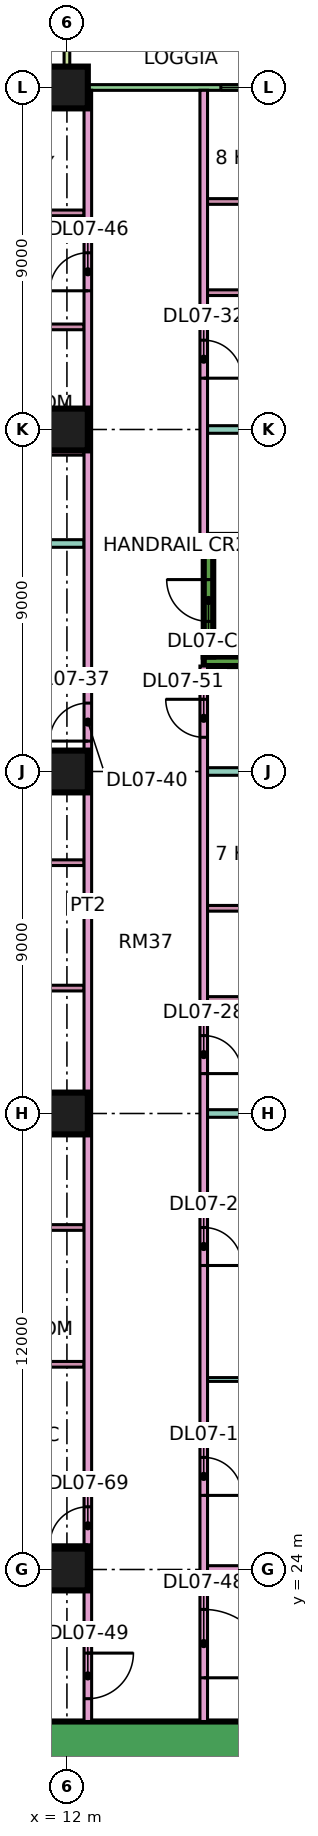
"""IFC4 building model, lengths in metres.
Left out: names, types, materials, properties, quantities, classifications, styles, units other than length and angle.
Written with IfcOpenShell. Run it as: python <this file> out.ifc"""

import sys

from ifc_helpers import new_model, si_unit, direction, frame, frame_2d, origin, origin_2d, place, context, subcontext, project, spatial, rectangle, extrude, element, fill, save


model = new_model("IFC4")
c1 = context("Model", 3, precision=1e-05, world=origin(), true_north=direction((0.0, 1.0)))
c2 = subcontext(c1, "Body", "Model", "MODEL_VIEW")
j1 = project(units=[si_unit("LENGTHUNIT", "METRE"), si_unit("PLANEANGLEUNIT", "RADIAN")], contexts=[c1])
p1 = place(None, origin())
s1 = spatial("IfcSite", under=j1, at=p1, CompositionType="ELEMENT")
p2 = place(p1, origin())
s2 = spatial("IfcBuilding", under=s1, at=p2, CompositionType="ELEMENT")
p3 = place(p2, frame((0.0, 0.0, 41.4)))
s3 = spatial("IfcBuildingStorey", under=s2, at=p3, CompositionType="ELEMENT", Elevation=41.4)
for number, where, z_axis, x_axis in (
    (1, (12.0, 24.0, 0.0), (0.0, 0.0, 1.0), (1.0, 0.0, 0.0)),
    (2, (12.0, 36.0, 0.0), (0.0, 0.0, 1.0), (1.0, 0.0, 0.0)),
    (3, (12.0, 45.0, 0.0), (0.0, 0.0, 1.0), (1.0, 0.0, 0.0)),
    (4, (12.0, 54.0, 0.0), (0.0, 0.0, 1.0), (1.0, 0.0, 0.0)),
    (5, (12.0, 63.0, 0.0), (0.0, 0.0, 1.0), (1.0, 0.0, 0.0)),
):
    element("IfcColumn", number, at=place(p3, frame(where, z_axis=z_axis, x_axis=x_axis)), inside=s3, PredefinedType="COLUMN", context=c2, shape_type="SweptSolid", body=[
        extrude(rectangle(XDim=1.1, YDim=1.1, at=origin_2d()), origin(), (0.0, 0.0, 1.0), 3.75),
    ])
p4 = place(p3, frame((9.0, 19.45, 0.0), z_axis=(0.0, 0.0, 1.0), x_axis=(1.0, 0.0, 0.0)))
e6 = element("IfcWall", 6, at=p4, inside=s3, PredefinedType="SHEAR", context=c2, shape_type="SweptSolid", body=[
    extrude(rectangle(XDim=25.0, YDim=1.1, at=frame_2d((12.5, 0.0))), origin(), (0.0, 0.0, 1.0), 3.75),
])
p5 = place(p4, frame((19.1, 0.0, 0.0)))
e7 = element("IfcOpeningElement", 7, at=p5, cuts=e6, PredefinedType="OPENING", context=c2, shape_type="SweptSolid", body=[
    extrude(rectangle(XDim=1.8, YDim=2.4, at=frame_2d((0.9, 1.2))), frame((0.0, 0.56, 0.0), z_axis=(0.0, -1.0, 0.0), x_axis=(1.0, 0.0, 0.0)), (0.0, 0.0, 1.0), 1.12),
])
for number, where, z_axis, x_axis in (
    (8, (15.6, 47.9, 0.0), (0.0, 0.0, 1.0), (1.0, 0.0, 0.0)),
    (9, (15.6, 51.1, 0.0), (0.0, 0.0, 1.0), (1.0, 0.0, 0.0)),
):
    element("IfcWall", number, at=place(p3, frame(where, z_axis=z_axis, x_axis=x_axis)), inside=s3, PredefinedType="SHEAR", context=c2, shape_type="SweptSolid", body=[
        extrude(rectangle(XDim=7.0, YDim=0.25, at=frame_2d((3.5, 0.0))), origin(), (0.0, 0.0, 1.0), 3.75),
    ])
p6 = place(p3, frame((15.725, 48.025, 0.0), z_axis=(0.0, 0.0, 1.0), x_axis=(0.0, 1.0, 0.0)))
e10 = element("IfcWall", 10, at=p6, inside=s3, PredefinedType="SHEAR", context=c2, shape_type="SweptSolid", body=[
    extrude(rectangle(XDim=2.95, YDim=0.25, at=frame_2d((1.475, 0.0))), origin(), (0.0, 0.0, 1.0), 3.75),
])
p7 = place(p6, frame((0.925, 0.0, 0.0)))
e11 = element("IfcOpeningElement", 11, at=p7, cuts=e10, PredefinedType="OPENING", context=c2, shape_type="SweptSolid", body=[
    extrude(rectangle(XDim=1.1, YDim=2.2, at=frame_2d((0.55, 1.1))), frame((0.0, 0.135, 0.0), z_axis=(0.0, -1.0, 0.0), x_axis=(1.0, 0.0, 0.0)), (0.0, 0.0, 1.0), 0.27),
])
p8 = place(p3, frame((22.425, 63.0, 0.0), z_axis=(0.0, 0.0, 1.0), x_axis=(-1.0, 0.0, 0.0)))
e12 = element("IfcWall", 12, at=p8, inside=s3, PredefinedType="SOLIDWALL", context=c2, shape_type="SweptSolid", body=[
    extrude(rectangle(XDim=10.35, YDim=0.15, at=frame_2d((5.175, 0.0))), origin(), (0.0, 0.0, 1.0), 3.35),
])
p9 = place(p8, frame((0.562, 0.0, 0.45)))
e13 = element("IfcOpeningElement", 13, at=p9, cuts=e12, PredefinedType="OPENING", context=c2, shape_type="SweptSolid", body=[
    extrude(rectangle(XDim=1.2, YDim=2.4, at=frame_2d((0.6, 1.2))), frame((0.0, 0.085, 0.0), z_axis=(0.0, -1.0, 0.0), x_axis=(1.0, 0.0, 0.0)), (0.0, 0.0, 1.0), 0.17),
])
p10 = place(p8, frame((3.975, 0.0, 0.45)))
e14 = element("IfcOpeningElement", 14, at=p10, cuts=e12, PredefinedType="OPENING", context=c2, shape_type="SweptSolid", body=[
    extrude(rectangle(XDim=2.4, YDim=2.4, at=frame_2d((1.2, 1.2))), frame((0.0, 0.085, 0.0), z_axis=(0.0, -1.0, 0.0), x_axis=(1.0, 0.0, 0.0)), (0.0, 0.0, 1.0), 0.17),
])
p11 = place(p3, frame((12.0, 64.5, 0.0), z_axis=(0.0, 0.0, 1.0), x_axis=(0.0, -1.0, 0.0)))
e15 = element("IfcWall", 15, at=p11, inside=s3, PredefinedType="SOLIDWALL", context=c2, shape_type="SweptSolid", body=[
    extrude(rectangle(XDim=1.5, YDim=0.15, at=frame_2d((0.75, 0.0))), origin(), (0.0, 0.0, 1.0), 3.35),
])
p12 = place(p3, frame((0.0, 36.0, 0.0), z_axis=(0.0, 0.0, 1.0), x_axis=(1.0, 0.0, 0.0)))
e16 = element("IfcWall", 16, at=p12, inside=s3, PredefinedType="PARTITIONING", context=c2, shape_type="SweptSolid", body=[
    extrude(rectangle(XDim=12.45, YDim=0.2, at=frame_2d((6.225, 0.0))), origin(), (0.0, 0.0, 1.0), 3.35),
])
p13 = place(p3, frame((-1.35, 51.0, 0.0), z_axis=(0.0, 0.0, 1.0), x_axis=(1.0, 0.0, 0.0)))
e17 = element("IfcWall", 17, at=p13, inside=s3, PredefinedType="PARTITIONING", context=c2, shape_type="SweptSolid", body=[
    extrude(rectangle(XDim=13.8, YDim=0.2, at=frame_2d((6.9, 0.0))), origin(), (0.0, 0.0, 1.0), 3.35),
])
p14 = place(p3, frame((0.074, 22.4, 0.0), z_axis=(0.0, 0.0, 1.0), x_axis=(1.0, 0.0, 0.0)))
e18 = element("IfcWall", 18, at=p14, inside=s3, PredefinedType="PARTITIONING", context=c2, shape_type="SweptSolid", body=[
    extrude(rectangle(XDim=12.376, YDim=0.2, at=frame_2d((6.188, 0.0))), origin(), (0.0, 0.0, 1.0), 3.35),
])
p15 = place(p3, frame((7.1, 47.4, 0.0), z_axis=(0.0, 0.0, 1.0), x_axis=(1.0, 0.0, 0.0)))
e19 = element("IfcWall", 19, at=p15, inside=s3, PredefinedType="PARTITIONING", context=c2, shape_type="SweptSolid", body=[
    extrude(rectangle(XDim=5.35, YDim=0.1, at=frame_2d((2.675, 0.0))), origin(), (0.0, 0.0, 1.0), 3.35),
])
p16 = place(p15, frame((2.3, 0.0, 0.0)))
e20 = element("IfcOpeningElement", 20, at=p16, cuts=e19, PredefinedType="OPENING", context=c2, shape_type="SweptSolid", body=[
    extrude(rectangle(XDim=0.9, YDim=2.1, at=frame_2d((0.45, 1.05))), frame((0.0, 0.06, 0.0), z_axis=(0.0, -1.0, 0.0), x_axis=(1.0, 0.0, 0.0)), (0.0, 0.0, 1.0), 0.12),
])
for number, where, z_axis, x_axis in (
    (21, (7.225, 39.3, 0.0), (0.0, 0.0, 1.0), (1.0, 0.0, 0.0)),
    (22, (7.225, 42.6, 0.0), (0.0, 0.0, 1.0), (1.0, 0.0, 0.0)),
    (23, (7.225, 45.3, 0.0), (0.0, 0.0, 1.0), (1.0, 0.0, 0.0)),
):
    element("IfcWall", number, at=place(p3, frame(where, z_axis=z_axis, x_axis=x_axis)), inside=s3, PredefinedType="PARTITIONING", context=c2, shape_type="SweptSolid", body=[
        extrude(rectangle(XDim=5.225, YDim=0.15, at=frame_2d((2.612, 0.0))), origin(), (0.0, 0.0, 1.0), 3.35),
    ])
p17 = place(p3, frame((8.275, 59.7, 0.0), z_axis=(0.0, 0.0, 1.0), x_axis=(1.0, 0.0, 0.0)))
e24 = element("IfcWall", 24, at=p17, inside=s3, PredefinedType="PARTITIONING", context=c2, shape_type="SweptSolid", body=[
    extrude(rectangle(XDim=4.175, YDim=0.15, at=frame_2d((2.087, 0.0))), origin(), (0.0, 0.0, 1.0), 3.35),
])
for number, where, z_axis, x_axis in (
    (25, (8.425, 26.4, 0.0), (0.0, 0.0, 1.0), (1.0, 0.0, 0.0)),
    (26, (8.425, 29.4, 0.0), (0.0, 0.0, 1.0), (1.0, 0.0, 0.0)),
    (27, (8.425, 33.0, 0.0), (0.0, 0.0, 1.0), (1.0, 0.0, 0.0)),
    (28, (8.425, 53.4, 0.0), (0.0, 0.0, 1.0), (1.0, 0.0, 0.0)),
):
    element("IfcWall", number, at=place(p3, frame(where, z_axis=z_axis, x_axis=x_axis)), inside=s3, PredefinedType="PARTITIONING", context=c2, shape_type="SweptSolid", body=[
        extrude(rectangle(XDim=4.025, YDim=0.15, at=frame_2d((2.012, 0.0))), origin(), (0.0, 0.0, 1.0), 3.35),
    ])
p18 = place(p3, frame((8.425, 56.7, 0.0), z_axis=(0.0, 0.0, 1.0), x_axis=(1.0, 0.0, 0.0)))
e29 = element("IfcWall", 29, at=p18, inside=s3, PredefinedType="PARTITIONING", context=c2, shape_type="SweptSolid", body=[
    extrude(rectangle(XDim=4.025, YDim=0.15, at=frame_2d((2.012, 0.0))), origin(), (0.0, 0.0, 1.0), 3.35),
])
p19 = place(p18, frame((1.575, 0.0, 0.0)))
e30 = element("IfcOpeningElement", 30, at=p19, cuts=e29, PredefinedType="OPENING", context=c2, shape_type="SweptSolid", body=[
    extrude(rectangle(XDim=0.8, YDim=2.1, at=frame_2d((0.4, 1.05))), frame((0.0, 0.085, 0.0), z_axis=(0.0, -1.0, 0.0), x_axis=(1.0, 0.0, 0.0)), (0.0, 0.0, 1.0), 0.17),
])
p20 = place(p3, frame((12.55, 20.0, 0.0), z_axis=(0.0, 0.0, 1.0), x_axis=(0.0, 1.0, 0.0)))
e31 = element("IfcWall", 31, at=p20, inside=s3, PredefinedType="PARTITIONING", context=c2, shape_type="SweptSolid", body=[
    extrude(rectangle(XDim=42.926, YDim=0.2, at=frame_2d((21.463, 0.0))), origin(), (0.0, 0.0, 1.0), 3.35),
])
p21 = place(p20, frame((25.8, 0.0, 0.0)))
e32 = element("IfcOpeningElement", 32, at=p21, cuts=e31, PredefinedType="OPENING", context=c2, shape_type="SweptSolid", body=[
    extrude(rectangle(XDim=1.0, YDim=2.1, at=frame_2d((0.5, 1.05))), frame((0.0, 0.11, 0.0), z_axis=(0.0, -1.0, 0.0), x_axis=(1.0, 0.0, 0.0)), (0.0, 0.0, 1.0), 0.22),
])
p22 = place(p20, frame((37.65, 0.0, 0.0)))
e33 = element("IfcOpeningElement", 33, at=p22, cuts=e31, PredefinedType="OPENING", context=c2, shape_type="SweptSolid", body=[
    extrude(rectangle(XDim=1.0, YDim=2.1, at=frame_2d((0.5, 1.05))), frame((0.0, 0.11, 0.0), z_axis=(0.0, -1.0, 0.0), x_axis=(1.0, 0.0, 0.0)), (0.0, 0.0, 1.0), 0.22),
])
p23 = place(p20, frame((0.6, 0.0, 0.0)))
e34 = element("IfcOpeningElement", 34, at=p23, cuts=e31, PredefinedType="OPENING", context=c2, shape_type="SweptSolid", body=[
    extrude(rectangle(XDim=1.2, YDim=2.1, at=frame_2d((0.6, 1.05))), frame((0.0, 0.11, 0.0), z_axis=(0.0, -1.0, 0.0), x_axis=(1.0, 0.0, 0.0)), (0.0, 0.0, 1.0), 0.22),
])
p24 = place(p20, frame((4.65, 0.0, 0.0)))
e35 = element("IfcOpeningElement", 35, at=p24, cuts=e31, PredefinedType="OPENING", context=c2, shape_type="SweptSolid", body=[
    extrude(rectangle(XDim=1.0, YDim=2.1, at=frame_2d((0.5, 1.05))), frame((0.0, 0.11, 0.0), z_axis=(0.0, -1.0, 0.0), x_axis=(1.0, 0.0, 0.0)), (0.0, 0.0, 1.0), 0.22),
])
p25 = place(p3, frame((15.6, 20.0, 0.0), z_axis=(0.0, 0.0, 1.0), x_axis=(0.0, 1.0, 0.0)))
e36 = element("IfcWall", 36, at=p25, inside=s3, PredefinedType="PARTITIONING", context=c2, shape_type="SweptSolid", body=[
    extrude(rectangle(XDim=27.775, YDim=0.2, at=frame_2d((13.887, 0.0))), origin(), (0.0, 0.0, 1.0), 3.35),
])
p26 = place(p25, frame((5.95, 0.0, 0.0)))
e37 = element("IfcOpeningElement", 37, at=p26, cuts=e36, PredefinedType="OPENING", context=c2, shape_type="SweptSolid", body=[
    extrude(rectangle(XDim=1.0, YDim=2.1, at=frame_2d((0.5, 1.05))), frame((0.0, 0.11, 0.0), z_axis=(0.0, -1.0, 0.0), x_axis=(1.0, 0.0, 0.0)), (0.0, 0.0, 1.0), 0.22),
])
p27 = place(p25, frame((12.0, 0.0, 0.0)))
e38 = element("IfcOpeningElement", 38, at=p27, cuts=e36, PredefinedType="OPENING", context=c2, shape_type="SweptSolid", body=[
    extrude(rectangle(XDim=1.0, YDim=2.1, at=frame_2d((0.5, 1.05))), frame((0.0, 0.11, 0.0), z_axis=(0.0, -1.0, 0.0), x_axis=(1.0, 0.0, 0.0)), (0.0, 0.0, 1.0), 0.22),
])
p28 = place(p25, frame((17.05, 0.0, 0.0)))
e39 = element("IfcOpeningElement", 39, at=p28, cuts=e36, PredefinedType="OPENING", context=c2, shape_type="SweptSolid", body=[
    extrude(rectangle(XDim=1.0, YDim=2.1, at=frame_2d((0.5, 1.05))), frame((0.0, 0.11, 0.0), z_axis=(0.0, -1.0, 0.0), x_axis=(1.0, 0.0, 0.0)), (0.0, 0.0, 1.0), 0.22),
])
p29 = place(p25, frame((1.15, 0.0, 0.0)))
e40 = element("IfcOpeningElement", 40, at=p29, cuts=e36, PredefinedType="OPENING", context=c2, shape_type="SweptSolid", body=[
    extrude(rectangle(XDim=1.8, YDim=2.1, at=frame_2d((0.9, 1.05))), frame((0.0, 0.11, 0.0), z_axis=(0.0, -1.0, 0.0), x_axis=(1.0, 0.0, 0.0)), (0.0, 0.0, 1.0), 0.22),
])
p30 = place(p25, frame((25.9, 0.0, 0.0)))
e41 = element("IfcOpeningElement", 41, at=p30, cuts=e36, PredefinedType="OPENING", context=c2, shape_type="SweptSolid", body=[
    extrude(rectangle(XDim=1.0, YDim=2.1, at=frame_2d((0.5, 1.05))), frame((0.0, 0.11, 0.0), z_axis=(0.0, -1.0, 0.0), x_axis=(1.0, 0.0, 0.0)), (0.0, 0.0, 1.0), 0.22),
])
p31 = place(p3, frame((15.6, 51.225, 0.0), z_axis=(0.0, 0.0, 1.0), x_axis=(0.0, 1.0, 0.0)))
e42 = element("IfcWall", 42, at=p31, inside=s3, PredefinedType="PARTITIONING", context=c2, shape_type="SweptSolid", body=[
    extrude(rectangle(XDim=11.701, YDim=0.2, at=frame_2d((5.851, 0.0))), origin(), (0.0, 0.0, 1.0), 3.35),
])
p32 = place(p31, frame((4.125, 0.0, 0.0)))
e43 = element("IfcOpeningElement", 43, at=p32, cuts=e42, PredefinedType="OPENING", context=c2, shape_type="SweptSolid", body=[
    extrude(rectangle(XDim=1.0, YDim=2.1, at=frame_2d((0.5, 1.05))), frame((0.0, 0.11, 0.0), z_axis=(0.0, -1.0, 0.0), x_axis=(1.0, 0.0, 0.0)), (0.0, 0.0, 1.0), 0.22),
])
p33 = place(p3, frame((15.7, 24.0, 0.0), z_axis=(0.0, 0.0, 1.0), x_axis=(1.0, 0.0, 0.0)))
e44 = element("IfcWall", 44, at=p33, inside=s3, PredefinedType="PARTITIONING", context=c2, shape_type="SweptSolid", body=[
    extrude(rectangle(XDim=5.8, YDim=0.2, at=frame_2d((2.9, 0.0))), origin(), (0.0, 0.0, 1.0), 3.35),
])
p34 = place(p3, frame((15.7, 29.0, 0.0), z_axis=(0.0, 0.0, 1.0), x_axis=(1.0, 0.0, 0.0)))
e45 = element("IfcWall", 45, at=p34, inside=s3, PredefinedType="PARTITIONING", context=c2, shape_type="SweptSolid", body=[
    extrude(rectangle(XDim=5.8, YDim=0.1, at=frame_2d((2.9, 0.0))), origin(), (0.0, 0.0, 1.0), 3.35),
])
p35 = place(p3, frame((15.7, 36.0, 0.0), z_axis=(0.0, 0.0, 1.0), x_axis=(1.0, 0.0, 0.0)))
e46 = element("IfcWall", 46, at=p35, inside=s3, PredefinedType="PARTITIONING", context=c2, shape_type="SweptSolid", body=[
    extrude(rectangle(XDim=8.3, YDim=0.2, at=frame_2d((4.15, 0.0))), origin(), (0.0, 0.0, 1.0), 3.35),
])
for number, where, z_axis, x_axis in (
    (47, (15.7, 39.0, 0.0), (0.0, 0.0, 1.0), (1.0, 0.0, 0.0)),
    (48, (15.7, 41.4, 0.0), (0.0, 0.0, 1.0), (1.0, 0.0, 0.0)),
):
    element("IfcWall", number, at=place(p3, frame(where, z_axis=z_axis, x_axis=x_axis)), inside=s3, PredefinedType="PARTITIONING", context=c2, shape_type="SweptSolid", body=[
        extrude(rectangle(XDim=3.125, YDim=0.15, at=frame_2d((1.562, 0.0))), origin(), (0.0, 0.0, 1.0), 3.35),
    ])
p36 = place(p3, frame((15.7, 45.0, 0.0), z_axis=(0.0, 0.0, 1.0), x_axis=(1.0, 0.0, 0.0)))
e49 = element("IfcWall", 49, at=p36, inside=s3, PredefinedType="PARTITIONING", context=c2, shape_type="SweptSolid", body=[
    extrude(rectangle(XDim=8.226, YDim=0.2, at=frame_2d((4.113, 0.0))), origin(), (0.0, 0.0, 1.0), 3.35),
])
p37 = place(p3, frame((15.7, 54.0, 0.0), z_axis=(0.0, 0.0, 1.0), x_axis=(1.0, 0.0, 0.0)))
e50 = element("IfcWall", 50, at=p37, inside=s3, PredefinedType="PARTITIONING", context=c2, shape_type="SweptSolid", body=[
    extrude(rectangle(XDim=8.3, YDim=0.2, at=frame_2d((4.15, 0.0))), origin(), (0.0, 0.0, 1.0), 3.35),
])
for number, where, z_axis, x_axis in (
    (51, (15.7, 57.6, 0.0), (0.0, 0.0, 1.0), (1.0, 0.0, 0.0)),
    (52, (15.7, 60.0, 0.0), (0.0, 0.0, 1.0), (1.0, 0.0, 0.0)),
):
    element("IfcWall", number, at=place(p3, frame(where, z_axis=z_axis, x_axis=x_axis)), inside=s3, PredefinedType="PARTITIONING", context=c2, shape_type="SweptSolid", body=[
        extrude(rectangle(XDim=3.125, YDim=0.15, at=frame_2d((1.562, 0.0))), origin(), (0.0, 0.0, 1.0), 3.35),
    ])
p38 = place(p10, origin())
e53 = element("IfcWindow", 53, at=p38, inside=s3, PartitioningType="SINGLE_PANEL", PredefinedType="WINDOW", context=c2, shape_type="SweptSolid", body=[
    extrude(rectangle(XDim=2.4, YDim=2.4, at=frame_2d((1.2, 1.2))), frame((0.0, 0.03, 0.0), z_axis=(0.0, -1.0, 0.0), x_axis=(1.0, 0.0, 0.0)), (0.0, 0.0, 1.0), 0.06),
])
fill(e14, e53)
p39 = place(p7, frame((1.1, 0.0, 0.0), z_axis=(0.0, 0.0, 1.0), x_axis=(-1.0, 0.0, 0.0)))
e54 = element("IfcDoor", 54, at=p39, inside=s3, OperationType="SINGLE_SWING_RIGHT", PredefinedType="DOOR", context=c2, shape_type="SweptSolid", body=[
    extrude(rectangle(XDim=1.1, YDim=2.2, at=frame_2d((0.55, 1.1))), frame((0.0, 0.025, 0.0), z_axis=(0.0, -1.0, 0.0), x_axis=(1.0, 0.0, 0.0)), (0.0, 0.0, 1.0), 0.05),
])
fill(e11, e54)
p40 = place(p26, frame((1.0, 0.0, 0.0), z_axis=(0.0, 0.0, 1.0), x_axis=(-1.0, 0.0, 0.0)))
e55 = element("IfcDoor", 55, at=p40, inside=s3, OperationType="SINGLE_SWING_LEFT", PredefinedType="DOOR", context=c2, shape_type="SweptSolid", body=[
    extrude(rectangle(XDim=1.0, YDim=2.1, at=frame_2d((0.5, 1.05))), frame((0.0, 0.025, 0.0), z_axis=(0.0, -1.0, 0.0), x_axis=(1.0, 0.0, 0.0)), (0.0, 0.0, 1.0), 0.05),
])
fill(e37, e55)
p41 = place(p27, frame((1.0, 0.0, 0.0), z_axis=(0.0, 0.0, 1.0), x_axis=(-1.0, 0.0, 0.0)))
e56 = element("IfcDoor", 56, at=p41, inside=s3, OperationType="SINGLE_SWING_LEFT", PredefinedType="DOOR", context=c2, shape_type="SweptSolid", body=[
    extrude(rectangle(XDim=1.0, YDim=2.1, at=frame_2d((0.5, 1.05))), frame((0.0, 0.025, 0.0), z_axis=(0.0, -1.0, 0.0), x_axis=(1.0, 0.0, 0.0)), (0.0, 0.0, 1.0), 0.05),
])
fill(e38, e56)
p42 = place(p28, frame((1.0, 0.0, 0.0), z_axis=(0.0, 0.0, 1.0), x_axis=(-1.0, 0.0, 0.0)))
e57 = element("IfcDoor", 57, at=p42, inside=s3, OperationType="SINGLE_SWING_LEFT", PredefinedType="DOOR", context=c2, shape_type="SweptSolid", body=[
    extrude(rectangle(XDim=1.0, YDim=2.1, at=frame_2d((0.5, 1.05))), frame((0.0, 0.025, 0.0), z_axis=(0.0, -1.0, 0.0), x_axis=(1.0, 0.0, 0.0)), (0.0, 0.0, 1.0), 0.05),
])
fill(e39, e57)
p43 = place(p32, frame((1.0, 0.0, 0.0), z_axis=(0.0, 0.0, 1.0), x_axis=(-1.0, 0.0, 0.0)))
e58 = element("IfcDoor", 58, at=p43, inside=s3, OperationType="SINGLE_SWING_LEFT", PredefinedType="DOOR", context=c2, shape_type="SweptSolid", body=[
    extrude(rectangle(XDim=1.0, YDim=2.1, at=frame_2d((0.5, 1.05))), frame((0.0, 0.025, 0.0), z_axis=(0.0, -1.0, 0.0), x_axis=(1.0, 0.0, 0.0)), (0.0, 0.0, 1.0), 0.05),
])
fill(e43, e58)
p44 = place(p21, origin())
e59 = element("IfcDoor", 59, at=p44, inside=s3, OperationType="SINGLE_SWING_LEFT", PredefinedType="DOOR", context=c2, shape_type="SweptSolid", body=[
    extrude(rectangle(XDim=1.0, YDim=2.1, at=frame_2d((0.5, 1.05))), frame((0.0, 0.025, 0.0), z_axis=(0.0, -1.0, 0.0), x_axis=(1.0, 0.0, 0.0)), (0.0, 0.0, 1.0), 0.05),
])
fill(e32, e59)
p45 = place(p22, origin())
e60 = element("IfcDoor", 60, at=p45, inside=s3, OperationType="SINGLE_SWING_LEFT", PredefinedType="DOOR", context=c2, shape_type="SweptSolid", body=[
    extrude(rectangle(XDim=1.0, YDim=2.1, at=frame_2d((0.5, 1.05))), frame((0.0, 0.025, 0.0), z_axis=(0.0, -1.0, 0.0), x_axis=(1.0, 0.0, 0.0)), (0.0, 0.0, 1.0), 0.05),
])
fill(e33, e60)
p46 = place(p29, frame((1.8, 0.0, 0.0), z_axis=(0.0, 0.0, 1.0), x_axis=(-1.0, 0.0, 0.0)))
e61 = element("IfcDoor", 61, at=p46, inside=s3, OperationType="DOUBLE_DOOR_SINGLE_SWING", PredefinedType="DOOR", context=c2, shape_type="SweptSolid", body=[
    extrude(rectangle(XDim=1.8, YDim=2.1, at=frame_2d((0.9, 1.05))), frame((0.0, 0.025, 0.0), z_axis=(0.0, -1.0, 0.0), x_axis=(1.0, 0.0, 0.0)), (0.0, 0.0, 1.0), 0.05),
])
fill(e40, e61)
p47 = place(p23, origin())
e62 = element("IfcDoor", 62, at=p47, inside=s3, OperationType="SINGLE_SWING_RIGHT", PredefinedType="DOOR", context=c2, shape_type="SweptSolid", body=[
    extrude(rectangle(XDim=1.2, YDim=2.1, at=frame_2d((0.6, 1.05))), frame((0.0, 0.025, 0.0), z_axis=(0.0, -1.0, 0.0), x_axis=(1.0, 0.0, 0.0)), (0.0, 0.0, 1.0), 0.05),
])
fill(e34, e62)
p48 = place(p30, frame((1.0, 0.0, 0.0), z_axis=(0.0, 0.0, 1.0), x_axis=(-1.0, 0.0, 0.0)))
e63 = element("IfcDoor", 63, at=p48, inside=s3, OperationType="SINGLE_SWING_RIGHT", PredefinedType="DOOR", context=c2, shape_type="SweptSolid", body=[
    extrude(rectangle(XDim=1.0, YDim=2.1, at=frame_2d((0.5, 1.05))), frame((0.0, 0.025, 0.0), z_axis=(0.0, -1.0, 0.0), x_axis=(1.0, 0.0, 0.0)), (0.0, 0.0, 1.0), 0.05),
])
fill(e41, e63)
p49 = place(p24, origin())
e64 = element("IfcDoor", 64, at=p49, inside=s3, OperationType="SINGLE_SWING_LEFT", PredefinedType="DOOR", context=c2, shape_type="SweptSolid", body=[
    extrude(rectangle(XDim=1.0, YDim=2.1, at=frame_2d((0.5, 1.05))), frame((0.0, 0.025, 0.0), z_axis=(0.0, -1.0, 0.0), x_axis=(1.0, 0.0, 0.0)), (0.0, 0.0, 1.0), 0.05),
])
fill(e35, e64)
save(model, sys.argv[1])
